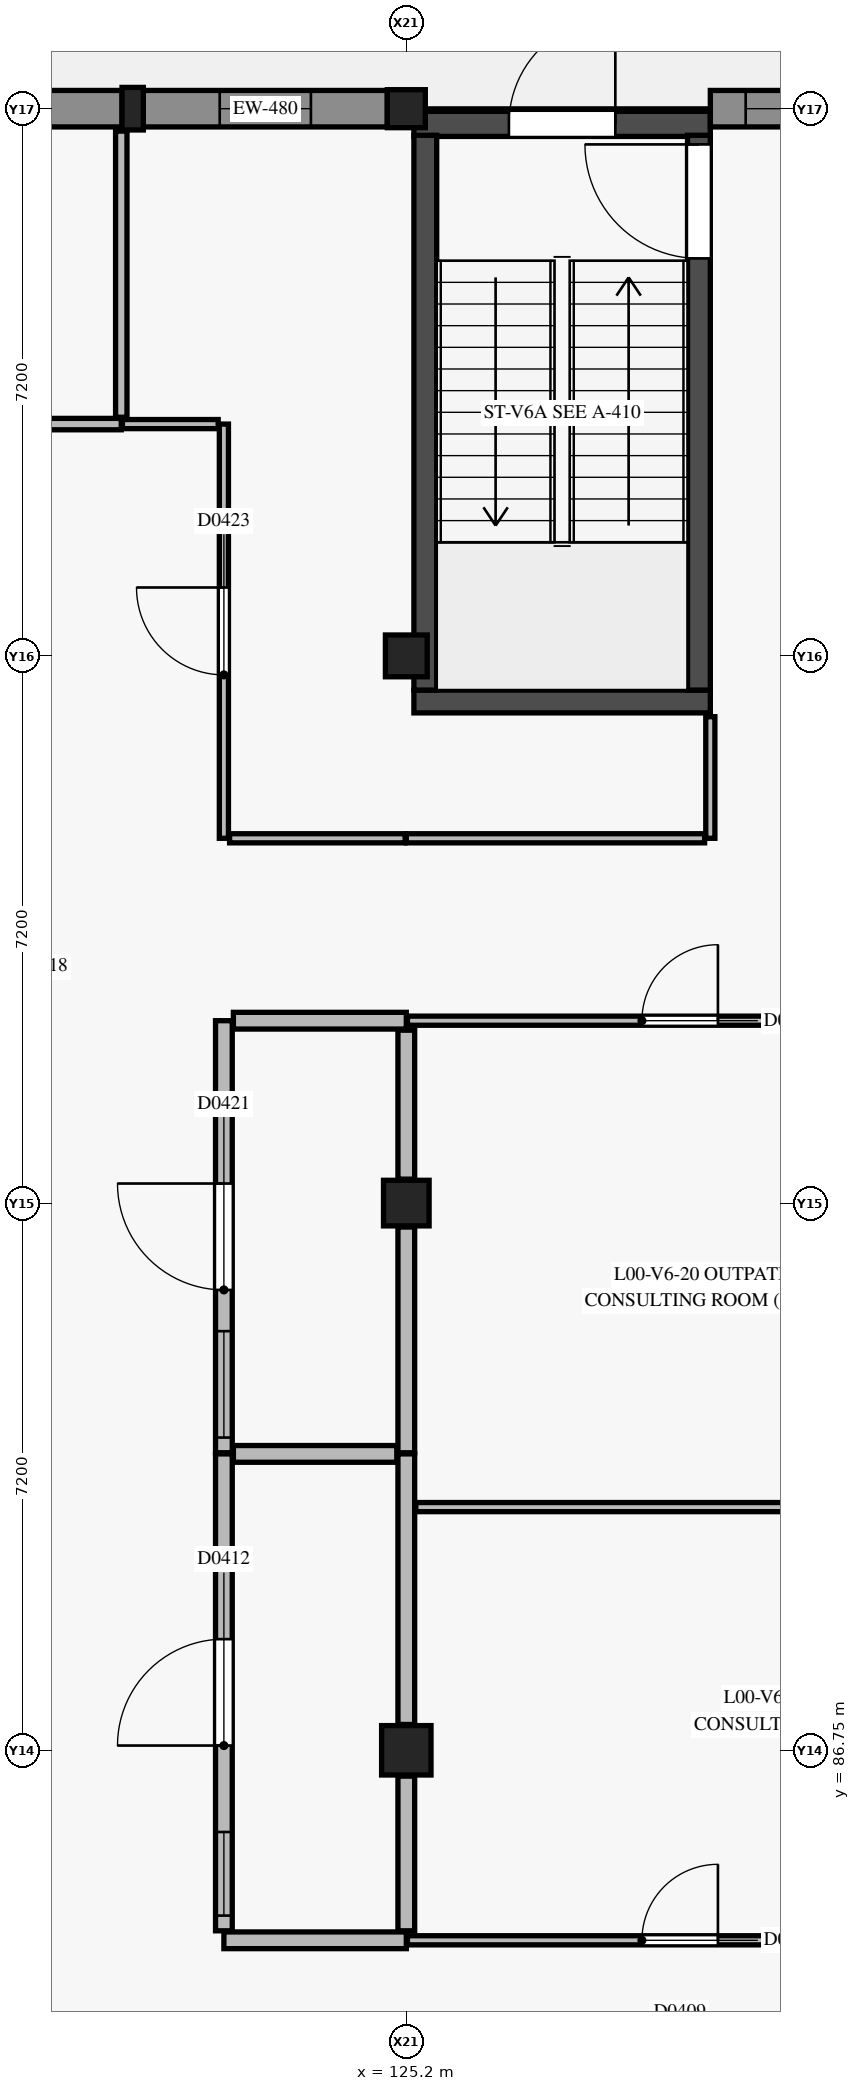
"""IFC4 building model, lengths in metres.
Left out: names, types, materials, properties, quantities, classifications, styles, units other than length and angle.
Written with IfcOpenShell. Run it as: python <this file> out.ifc"""

import sys

from ifc_helpers import new_model, si_unit, direction, frame, frame_2d, origin, origin_2d, place, context, subcontext, project, spatial, rectangle, extrude, element, fill, save


model = new_model("IFC4")
c1 = context("Model", 3, precision=1e-05, world=origin(), true_north=direction((0.0, 1.0)))
c2 = subcontext(c1, "Body", "Model", "MODEL_VIEW")
j1 = project(units=[si_unit("LENGTHUNIT", "METRE"), si_unit("PLANEANGLEUNIT", "RADIAN")], contexts=[c1])
p1 = place(None, origin())
s1 = spatial("IfcSite", under=j1, at=p1, CompositionType="ELEMENT")
p2 = place(p1, origin())
s2 = spatial("IfcBuilding", under=s1, at=p2, CompositionType="ELEMENT")
p3 = place(p2, origin())
s3 = spatial("IfcBuildingStorey", under=s2, at=p3, CompositionType="ELEMENT", Elevation=0.0)
p4 = place(p3, frame((125.2, 86.75, 0.0), z_axis=(0.0, 0.0, 1.0), x_axis=(1.0, 0.0, 0.0)))
e1 = element("IfcColumn", 1, at=p4, inside=s3, PredefinedType="COLUMN", context=c2, shape_type="SweptSolid", body=[
    extrude(rectangle(XDim=0.65, YDim=0.65, at=origin_2d()), origin(), (0.0, 0.0, 1.0), 4.8),
])
p5 = place(p3, frame((125.2, 93.95, 0.0), z_axis=(0.0, 0.0, 1.0), x_axis=(1.0, 0.0, 0.0)))
e2 = element("IfcColumn", 2, at=p5, inside=s3, PredefinedType="COLUMN", context=c2, shape_type="SweptSolid", body=[
    extrude(rectangle(XDim=0.6, YDim=0.6, at=origin_2d()), origin(), (0.0, 0.0, 1.0), 4.8),
])
p6 = place(p3, frame((125.2, 101.15, 0.0), z_axis=(0.0, 0.0, 1.0), x_axis=(1.0, 0.0, 0.0)))
e3 = element("IfcColumn", 3, at=p6, inside=s3, PredefinedType="COLUMN", context=c2, shape_type="SweptSolid", body=[
    extrude(rectangle(XDim=0.55, YDim=0.55, at=origin_2d()), origin(), (0.0, 0.0, 1.0), 4.8),
])
p7 = place(p3, frame((125.2, 108.35, 0.0), z_axis=(0.0, 0.0, 1.0), x_axis=(1.0, 0.0, 0.0)))
e4 = element("IfcColumn", 4, at=p7, inside=s3, PredefinedType="COLUMN", context=c2, shape_type="SweptSolid", body=[
    extrude(rectangle(XDim=0.5, YDim=0.5, at=origin_2d()), origin(), (0.0, 0.0, 1.0), 4.8),
])
p8 = place(p3, frame((121.6, 108.35, 0.0), z_axis=(0.0, 0.0, 1.0), x_axis=(1.0, 0.0, 0.0)))
e5 = element("IfcColumn", 5, at=p8, inside=s3, PredefinedType="PILASTER", context=c2, shape_type="SweptSolid", body=[
    extrude(rectangle(XDim=0.28, YDim=0.56, at=origin_2d()), origin(), (0.0, 0.0, 1.0), 4.8),
])
p9 = place(p3, frame((125.3, 100.55, 0.0), z_axis=(0.0, 0.0, 1.0), x_axis=(1.0, 0.0, 0.0)))
e6 = element("IfcWall", 6, at=p9, inside=s3, PredefinedType="SHEAR", context=c2, shape_type="SweptSolid", body=[
    extrude(rectangle(XDim=3.9, YDim=0.3, at=frame_2d((1.95, 0.0))), origin(), (0.0, 0.0, 1.0), 4.52),
])
p10 = place(p3, frame((125.3, 108.15, 0.0), z_axis=(0.0, 0.0, 1.0), x_axis=(1.0, 0.0, 0.0)))
e7 = element("IfcWall", 7, at=p10, inside=s3, PredefinedType="SHEAR", context=c2, shape_type="SweptSolid", body=[
    extrude(rectangle(XDim=3.9, YDim=0.33, at=frame_2d((1.95, 0.0))), origin(), (0.0, 0.0, 1.0), 4.52),
])
p11 = place(p10, frame((1.25, 0.0, 0.0)))
e8 = element("IfcOpeningElement", 8, at=p11, cuts=e7, PredefinedType="OPENING", context=c2, shape_type="SweptSolid", body=[
    extrude(rectangle(XDim=1.4, YDim=2.25, at=frame_2d((0.7, 1.125))), frame((0.0, 0.175, 0.0), z_axis=(0.0, -1.0, 0.0), x_axis=(1.0, 0.0, 0.0)), (0.0, 0.0, 1.0), 0.35),
])
p12 = place(p3, frame((125.45, 100.7, 0.0), z_axis=(0.0, 0.0, 1.0), x_axis=(0.0, 1.0, 0.0)))
e9 = element("IfcWall", 9, at=p12, inside=s3, PredefinedType="SHEAR", context=c2, shape_type="SweptSolid", body=[
    extrude(rectangle(XDim=7.3, YDim=0.3, at=frame_2d((3.65, 0.0))), origin(), (0.0, 0.0, 1.0), 4.52),
])
p13 = place(p3, frame((129.05, 100.7, 0.0), z_axis=(0.0, 0.0, 1.0), x_axis=(0.0, 1.0, 0.0)))
e10 = element("IfcWall", 10, at=p13, inside=s3, PredefinedType="SHEAR", context=c2, shape_type="SweptSolid", body=[
    extrude(rectangle(XDim=7.3, YDim=0.3, at=frame_2d((3.65, 0.0))), origin(), (0.0, 0.0, 1.0), 4.52),
])
p14 = place(p13, frame((5.68, 0.0, 0.0)))
e11 = element("IfcOpeningElement", 11, at=p14, cuts=e10, PredefinedType="OPENING", context=c2, shape_type="SweptSolid", body=[
    extrude(rectangle(XDim=1.5, YDim=2.15, at=frame_2d((0.75, 1.075))), frame((0.0, 0.16, 0.0), z_axis=(0.0, -1.0, 0.0), x_axis=(1.0, 0.0, 0.0)), (0.0, 0.0, 1.0), 0.32),
])
p15 = place(p3, frame((118.3, 108.35, 0.0), z_axis=(0.0, 0.0, 1.0), x_axis=(1.0, 0.0, 0.0)))
e12 = element("IfcWall", 12, at=p15, inside=s3, PredefinedType="SOLIDWALL", context=c2, shape_type="SweptSolid", body=[
    extrude(rectangle(XDim=3.16, YDim=0.48, at=frame_2d((1.58, 0.0))), origin(), (0.0, 0.0, 1.0), 3.7),
])
p16 = place(p15, frame((1.055, 0.0, 0.9)))
e13 = element("IfcOpeningElement", 13, at=p16, cuts=e12, PredefinedType="OPENING", context=c2, shape_type="SweptSolid", body=[
    extrude(rectangle(XDim=1.05, YDim=1.8, at=frame_2d((0.525, 0.9))), frame((0.0, 0.25, 0.0), z_axis=(0.0, -1.0, 0.0), x_axis=(1.0, 0.0, 0.0)), (0.0, 0.0, 1.0), 0.5),
])
p17 = place(p3, frame((121.74, 108.35, 0.0), z_axis=(0.0, 0.0, 1.0), x_axis=(1.0, 0.0, 0.0)))
e14 = element("IfcWall", 14, at=p17, inside=s3, PredefinedType="SOLIDWALL", context=c2, shape_type="SweptSolid", body=[
    extrude(rectangle(XDim=3.21, YDim=0.48, at=frame_2d((1.605, 0.0))), origin(), (0.0, 0.0, 1.0), 3.7),
])
p18 = place(p17, frame((1.005, 0.0, 0.9)))
e15 = element("IfcOpeningElement", 15, at=p18, cuts=e14, PredefinedType="OPENING", context=c2, shape_type="SweptSolid", body=[
    extrude(rectangle(XDim=1.2, YDim=1.8, at=frame_2d((0.6, 0.9))), frame((0.0, 0.25, 0.0), z_axis=(0.0, -1.0, 0.0), x_axis=(1.0, 0.0, 0.0)), (0.0, 0.0, 1.0), 0.5),
])
p19 = place(p3, frame((129.2, 108.35, 0.0), z_axis=(0.0, 0.0, 1.0), x_axis=(1.0, 0.0, 0.0)))
e16 = element("IfcWall", 16, at=p19, inside=s3, PredefinedType="SOLIDWALL", context=c2, shape_type="SweptSolid", body=[
    extrude(rectangle(XDim=2.825, YDim=0.48, at=frame_2d((1.413, 0.0))), origin(), (0.0, 0.0, 1.0), 3.7),
])
p20 = place(p19, frame((0.465, 0.0, 0.9)))
e17 = element("IfcOpeningElement", 17, at=p20, cuts=e16, PredefinedType="OPENING", context=c2, shape_type="SweptSolid", body=[
    extrude(rectangle(XDim=1.4, YDim=1.8, at=frame_2d((0.7, 0.9))), frame((0.0, 0.25, 0.0), z_axis=(0.0, -1.0, 0.0), x_axis=(1.0, 0.0, 0.0)), (0.0, 0.0, 1.0), 0.5),
])
p21 = place(p3, frame((122.8, 84.25, 0.0), z_axis=(0.0, 0.0, 1.0), x_axis=(1.0, 0.0, 0.0)))
e18 = element("IfcWall", 18, at=p21, inside=s3, PredefinedType="PARTITIONING", context=c2, shape_type="SweptSolid", body=[
    extrude(rectangle(XDim=2.4, YDim=0.22, at=frame_2d((1.2, 0.0))), origin(), (0.0, 0.0, 1.0), 3.785),
])
p22 = place(p3, frame((122.8, 84.375, 0.0), z_axis=(0.0, 0.0, 1.0), x_axis=(0.0, 1.0, 0.0)))
e19 = element("IfcWall", 19, at=p22, inside=s3, PredefinedType="PARTITIONING", context=c2, shape_type="SweptSolid", body=[
    extrude(rectangle(XDim=6.275, YDim=0.22, at=frame_2d((3.137, 0.0))), origin(), (0.0, 0.0, 1.0), 3.805),
])
p23 = place(p22, frame((2.438, 0.0, 0.0)))
e20 = element("IfcOpeningElement", 20, at=p23, cuts=e19, PredefinedType="OPENING", context=c2, shape_type="SweptSolid", body=[
    extrude(rectangle(XDim=1.4, YDim=2.2, at=frame_2d((0.7, 1.1))), frame((0.0, 0.12, 0.0), z_axis=(0.0, -1.0, 0.0), x_axis=(1.0, 0.0, 0.0)), (0.0, 0.0, 1.0), 0.24),
])
p24 = place(p22, frame((0.2, 0.0, 1.05)))
e21 = element("IfcOpeningElement", 21, at=p24, cuts=e19, PredefinedType="OPENING", context=c2, shape_type="SweptSolid", body=[
    extrude(rectangle(XDim=1.1, YDim=1.1, at=frame_2d((0.55, 0.55))), frame((0.0, 0.12, 0.0), z_axis=(0.0, -1.0, 0.0), x_axis=(1.0, 0.0, 0.0)), (0.0, 0.0, 1.0), 0.24),
])
p25 = place(p3, frame((122.8, 90.665, 0.0), z_axis=(0.0, 0.0, 1.0), x_axis=(0.0, 1.0, 0.0)))
e22 = element("IfcWall", 22, at=p25, inside=s3, PredefinedType="PARTITIONING", context=c2, shape_type="SweptSolid", body=[
    extrude(rectangle(XDim=5.685, YDim=0.22, at=frame_2d((2.843, 0.0))), origin(), (0.0, 0.0, 1.0), 3.955),
])
p26 = place(p25, frame((2.143, 0.0, 0.0)))
e23 = element("IfcOpeningElement", 23, at=p26, cuts=e22, PredefinedType="OPENING", context=c2, shape_type="SweptSolid", body=[
    extrude(rectangle(XDim=1.4, YDim=2.2, at=frame_2d((0.7, 1.1))), frame((0.0, 0.12, 0.0), z_axis=(0.0, -1.0, 0.0), x_axis=(1.0, 0.0, 0.0)), (0.0, 0.0, 1.0), 0.24),
])
p27 = place(p25, frame((0.2, 0.0, 1.05)))
e24 = element("IfcOpeningElement", 24, at=p27, cuts=e22, PredefinedType="OPENING", context=c2, shape_type="SweptSolid", body=[
    extrude(rectangle(XDim=1.4, YDim=1.1, at=frame_2d((0.7, 0.55))), frame((0.0, 0.12, 0.0), z_axis=(0.0, -1.0, 0.0), x_axis=(1.0, 0.0, 0.0)), (0.0, 0.0, 1.0), 0.24),
])
p28 = place(p3, frame((122.925, 96.35, 0.0), z_axis=(0.0, 0.0, 1.0), x_axis=(1.0, 0.0, 0.0)))
e25 = element("IfcWall", 25, at=p28, inside=s3, PredefinedType="PARTITIONING", context=c2, shape_type="SweptSolid", body=[
    extrude(rectangle(XDim=2.275, YDim=0.22, at=frame_2d((1.137, 0.0))), origin(), (0.0, 0.0, 1.0), 3.855),
])
p29 = place(p3, frame((120.4, 104.2, 0.0), z_axis=(0.0, 0.0, 1.0), x_axis=(1.0, 0.0, 0.0)))
e26 = element("IfcWall", 26, at=p29, inside=s3, PredefinedType="PARTITIONING", context=c2, shape_type="SweptSolid", body=[
    extrude(rectangle(XDim=1.05, YDim=0.15, at=frame_2d((0.525, 0.0))), origin(), (0.0, 0.0, 1.0), 4.52),
])
p30 = place(p3, frame((125.215, 84.25, 0.0), z_axis=(0.0, 0.0, 1.0), x_axis=(1.0, 0.0, 0.0)))
e27 = element("IfcWall", 27, at=p30, inside=s3, PredefinedType="PARTITIONING", context=c2, shape_type="SweptSolid", body=[
    extrude(rectangle(XDim=7.17, YDim=0.12, at=frame_2d((3.585, 0.0))), origin(), (0.0, 0.0, 1.0), 3.785),
])
p31 = place(p30, frame((3.085, 0.0, 0.0)))
e28 = element("IfcOpeningElement", 28, at=p31, cuts=e27, PredefinedType="OPENING", context=c2, shape_type="SweptSolid", body=[
    extrude(rectangle(XDim=1.0, YDim=2.15, at=frame_2d((0.5, 1.075))), frame((0.0, 0.07, 0.0), z_axis=(0.0, -1.0, 0.0), x_axis=(1.0, 0.0, 0.0)), (0.0, 0.0, 1.0), 0.14),
])
p32 = place(p3, frame((125.215, 96.35, 0.0), z_axis=(0.0, 0.0, 1.0), x_axis=(1.0, 0.0, 0.0)))
e29 = element("IfcWall", 29, at=p32, inside=s3, PredefinedType="PARTITIONING", context=c2, shape_type="SweptSolid", body=[
    extrude(rectangle(XDim=7.17, YDim=0.12, at=frame_2d((3.585, 0.0))), origin(), (0.0, 0.0, 1.0), 3.705),
])
p33 = place(p32, frame((3.085, 0.0, 0.0)))
e30 = element("IfcOpeningElement", 30, at=p33, cuts=e29, PredefinedType="OPENING", context=c2, shape_type="SweptSolid", body=[
    extrude(rectangle(XDim=1.0, YDim=2.15, at=frame_2d((0.5, 1.075))), frame((0.0, 0.07, 0.0), z_axis=(0.0, -1.0, 0.0), x_axis=(1.0, 0.0, 0.0)), (0.0, 0.0, 1.0), 0.14),
])
p34 = place(p3, frame((122.8, 98.75, 0.0), z_axis=(0.0, 0.0, 1.0), x_axis=(0.0, 1.0, 0.0)))
e31 = element("IfcWall", 31, at=p34, inside=s3, PredefinedType="PARTITIONING", context=c2, shape_type="SweptSolid", body=[
    extrude(rectangle(XDim=5.45, YDim=0.12, at=frame_2d((2.725, 0.0))), origin(), (0.0, 0.0, 1.0), 3.925),
])
p35 = place(p34, frame((2.15, 0.0, 0.0)))
e32 = element("IfcOpeningElement", 32, at=p35, cuts=e31, PredefinedType="OPENING", context=c2, shape_type="SweptSolid", body=[
    extrude(rectangle(XDim=1.15, YDim=2.15, at=frame_2d((0.575, 1.075))), frame((0.0, 0.07, 0.0), z_axis=(0.0, -1.0, 0.0), x_axis=(1.0, 0.0, 0.0)), (0.0, 0.0, 1.0), 0.14),
])
p36 = place(p3, frame((121.465, 104.2, 0.0), z_axis=(0.0, 0.0, 1.0), x_axis=(1.0, 0.0, 0.0)))
e33 = element("IfcWall", 33, at=p36, inside=s3, PredefinedType="PARTITIONING", context=c2, shape_type="SweptSolid", body=[
    extrude(rectangle(XDim=1.26, YDim=0.12, at=frame_2d((0.63, 0.0))), origin(), (0.0, 0.0, 1.0), 4.52),
])
p37 = place(p3, frame((129.2, 98.75, 0.0), z_axis=(0.0, 0.0, 1.0), x_axis=(0.0, 1.0, 0.0)))
e34 = element("IfcWall", 34, at=p37, inside=s3, PredefinedType="PARTITIONING", context=c2, shape_type="SweptSolid", body=[
    extrude(rectangle(XDim=1.6, YDim=0.12, at=frame_2d((0.8, 0.0))), origin(), (0.0, 0.0, 1.0), 4.045),
])
p38 = place(p3, frame((125.2, 98.75, 0.0), z_axis=(0.0, 0.0, 1.0), x_axis=(1.0, 0.0, 0.0)))
e35 = element("IfcWall", 35, at=p38, inside=s3, PredefinedType="PARTITIONING", context=c2, shape_type="SweptSolid", body=[
    extrude(rectangle(XDim=3.925, YDim=0.12, at=frame_2d((1.962, 0.0))), origin(), (0.0, 0.0, 1.0), 3.855),
])
p39 = place(p3, frame((122.875, 98.75, 0.0), z_axis=(0.0, 0.0, 1.0), x_axis=(1.0, 0.0, 0.0)))
e36 = element("IfcWall", 36, at=p39, inside=s3, PredefinedType="PARTITIONING", context=c2, shape_type="SweptSolid", body=[
    extrude(rectangle(XDim=2.31, YDim=0.12, at=frame_2d((1.155, 0.0))), origin(), (0.0, 0.0, 1.0), 3.855),
])
p40 = place(p3, frame((125.2, 84.375, 0.0), z_axis=(0.0, 0.0, 1.0), x_axis=(0.0, 1.0, 0.0)))
e37 = element("IfcWall", 37, at=p40, inside=s3, PredefinedType="PARTITIONING", context=c2, shape_type="SweptSolid", body=[
    extrude(rectangle(XDim=2.035, YDim=0.22, at=frame_2d((1.018, 0.0))), origin(), (0.0, 0.0, 1.0), 3.785),
])
p41 = place(p3, frame((125.2, 87.09, 0.0), z_axis=(0.0, 0.0, 1.0), x_axis=(0.0, 1.0, 0.0)))
e38 = element("IfcWall", 38, at=p41, inside=s3, PredefinedType="PARTITIONING", context=c2, shape_type="SweptSolid", body=[
    extrude(rectangle(XDim=3.56, YDim=0.22, at=frame_2d((1.78, 0.0))), origin(), (0.0, 0.0, 1.0), 3.855),
])
p42 = place(p3, frame((122.925, 90.65, 0.0), z_axis=(0.0, 0.0, 1.0), x_axis=(1.0, 0.0, 0.0)))
e39 = element("IfcWall", 39, at=p42, inside=s3, PredefinedType="PARTITIONING", context=c2, shape_type="SweptSolid", body=[
    extrude(rectangle(XDim=2.15, YDim=0.22, at=frame_2d((1.075, 0.0))), origin(), (0.0, 0.0, 1.0), 4.52),
])
p43 = place(p3, frame((125.2, 90.665, 0.0), z_axis=(0.0, 0.0, 1.0), x_axis=(0.0, 1.0, 0.0)))
e40 = element("IfcWall", 40, at=p43, inside=s3, PredefinedType="PARTITIONING", context=c2, shape_type="SweptSolid", body=[
    extrude(rectangle(XDim=2.97, YDim=0.22, at=frame_2d((1.485, 0.0))), origin(), (0.0, 0.0, 1.0), 3.855),
])
p44 = place(p3, frame((125.2, 94.265, 0.0), z_axis=(0.0, 0.0, 1.0), x_axis=(0.0, 1.0, 0.0)))
e41 = element("IfcWall", 41, at=p44, inside=s3, PredefinedType="PARTITIONING", context=c2, shape_type="SweptSolid", body=[
    extrude(rectangle(XDim=1.96, YDim=0.22, at=frame_2d((0.98, 0.0))), origin(), (0.0, 0.0, 1.0), 3.855),
])
p45 = place(p3, frame((121.45, 104.29, 0.0), z_axis=(0.0, 0.0, 1.0), x_axis=(0.0, 1.0, 0.0)))
e42 = element("IfcWall", 42, at=p45, inside=s3, PredefinedType="PARTITIONING", context=c2, shape_type="SweptSolid", body=[
    extrude(rectangle(XDim=3.765, YDim=0.15, at=frame_2d((1.882, 0.0))), origin(), (0.0, 0.0, 1.0), 4.045),
])
p46 = place(p3, frame((125.325, 89.95, 0.0), z_axis=(0.0, 0.0, 1.0), x_axis=(1.0, 0.0, 0.0)))
e43 = element("IfcWall", 43, at=p46, inside=s3, PredefinedType="PARTITIONING", context=c2, shape_type="SweptSolid", body=[
    extrude(rectangle(XDim=6.985, YDim=0.12, at=frame_2d((3.493, 0.0))), origin(), (0.0, 0.0, 1.0), 4.52),
])
p47 = place(p11, origin())
e44 = element("IfcDoor", 44, at=p47, inside=s3, OperationType="SINGLE_SWING_RIGHT", PredefinedType="DOOR", context=c2, shape_type="SweptSolid", body=[
    extrude(rectangle(XDim=1.4, YDim=2.25, at=frame_2d((0.7, 1.125))), frame((0.0, 0.025, 0.0), z_axis=(0.0, -1.0, 0.0), x_axis=(1.0, 0.0, 0.0)), (0.0, 0.0, 1.0), 0.05),
])
fill(e8, e44)
p48 = place(p18, origin())
e45 = element("IfcWindow", 45, at=p48, inside=s3, PartitioningType="SINGLE_PANEL", PredefinedType="WINDOW", context=c2, shape_type="SweptSolid", body=[
    extrude(rectangle(XDim=1.2, YDim=1.8, at=frame_2d((0.6, 0.9))), frame((0.0, 0.03, 0.0), z_axis=(0.0, -1.0, 0.0), x_axis=(1.0, 0.0, 0.0)), (0.0, 0.0, 1.0), 0.06),
])
fill(e15, e45)
p49 = place(p20, origin())
e46 = element("IfcWindow", 46, at=p49, inside=s3, PartitioningType="SINGLE_PANEL", PredefinedType="WINDOW", context=c2, shape_type="SweptSolid", body=[
    extrude(rectangle(XDim=1.4, YDim=1.8, at=frame_2d((0.7, 0.9))), frame((0.0, 0.03, 0.0), z_axis=(0.0, -1.0, 0.0), x_axis=(1.0, 0.0, 0.0)), (0.0, 0.0, 1.0), 0.06),
])
fill(e17, e46)
p50 = place(p14, origin())
e47 = element("IfcDoor", 47, at=p50, inside=s3, OperationType="SINGLE_SWING_RIGHT", PredefinedType="DOOR", context=c2, shape_type="SweptSolid", body=[
    extrude(rectangle(XDim=1.5, YDim=2.15, at=frame_2d((0.75, 1.075))), frame((0.0, 0.025, 0.0), z_axis=(0.0, -1.0, 0.0), x_axis=(1.0, 0.0, 0.0)), (0.0, 0.0, 1.0), 0.05),
])
fill(e11, e47)
p51 = place(p23, origin())
e48 = element("IfcDoor", 48, at=p51, inside=s3, OperationType="SINGLE_SWING_LEFT", PredefinedType="DOOR", context=c2, shape_type="SweptSolid", body=[
    extrude(rectangle(XDim=1.4, YDim=2.2, at=frame_2d((0.7, 1.1))), frame((0.0, 0.025, 0.0), z_axis=(0.0, -1.0, 0.0), x_axis=(1.0, 0.0, 0.0)), (0.0, 0.0, 1.0), 0.05),
])
fill(e20, e48)
p52 = place(p24, origin())
e49 = element("IfcWindow", 49, at=p52, inside=s3, PartitioningType="SINGLE_PANEL", PredefinedType="WINDOW", context=c2, shape_type="SweptSolid", body=[
    extrude(rectangle(XDim=1.1, YDim=1.1, at=frame_2d((0.55, 0.55))), frame((0.0, 0.03, 0.0), z_axis=(0.0, -1.0, 0.0), x_axis=(1.0, 0.0, 0.0)), (0.0, 0.0, 1.0), 0.06),
])
fill(e21, e49)
p53 = place(p31, origin())
e50 = element("IfcDoor", 50, at=p53, inside=s3, OperationType="SINGLE_SWING_RIGHT", PredefinedType="DOOR", context=c2, shape_type="SweptSolid", body=[
    extrude(rectangle(XDim=1.0, YDim=2.15, at=frame_2d((0.5, 1.075))), frame((0.0, 0.025, 0.0), z_axis=(0.0, -1.0, 0.0), x_axis=(1.0, 0.0, 0.0)), (0.0, 0.0, 1.0), 0.05),
])
fill(e28, e50)
p54 = place(p33, origin())
e51 = element("IfcDoor", 51, at=p54, inside=s3, OperationType="SINGLE_SWING_RIGHT", PredefinedType="DOOR", context=c2, shape_type="SweptSolid", body=[
    extrude(rectangle(XDim=1.0, YDim=2.15, at=frame_2d((0.5, 1.075))), frame((0.0, 0.025, 0.0), z_axis=(0.0, -1.0, 0.0), x_axis=(1.0, 0.0, 0.0)), (0.0, 0.0, 1.0), 0.05),
])
fill(e30, e51)
p55 = place(p26, origin())
e52 = element("IfcDoor", 52, at=p55, inside=s3, OperationType="SINGLE_SWING_RIGHT", PredefinedType="DOOR", context=c2, shape_type="SweptSolid", body=[
    extrude(rectangle(XDim=1.4, YDim=2.2, at=frame_2d((0.7, 1.1))), frame((0.0, 0.025, 0.0), z_axis=(0.0, -1.0, 0.0), x_axis=(1.0, 0.0, 0.0)), (0.0, 0.0, 1.0), 0.05),
])
fill(e23, e52)
p56 = place(p27, origin())
e53 = element("IfcWindow", 53, at=p56, inside=s3, PartitioningType="SINGLE_PANEL", PredefinedType="WINDOW", context=c2, shape_type="SweptSolid", body=[
    extrude(rectangle(XDim=1.4, YDim=1.1, at=frame_2d((0.7, 0.55))), frame((0.0, 0.03, 0.0), z_axis=(0.0, -1.0, 0.0), x_axis=(1.0, 0.0, 0.0)), (0.0, 0.0, 1.0), 0.06),
])
fill(e24, e53)
p57 = place(p35, origin())
e54 = element("IfcDoor", 54, at=p57, inside=s3, OperationType="SINGLE_SWING_RIGHT", PredefinedType="DOOR", context=c2, shape_type="SweptSolid", body=[
    extrude(rectangle(XDim=1.15, YDim=2.15, at=frame_2d((0.575, 1.075))), frame((0.0, 0.025, 0.0), z_axis=(0.0, -1.0, 0.0), x_axis=(1.0, 0.0, 0.0)), (0.0, 0.0, 1.0), 0.05),
])
fill(e32, e54)
save(model, sys.argv[1])
